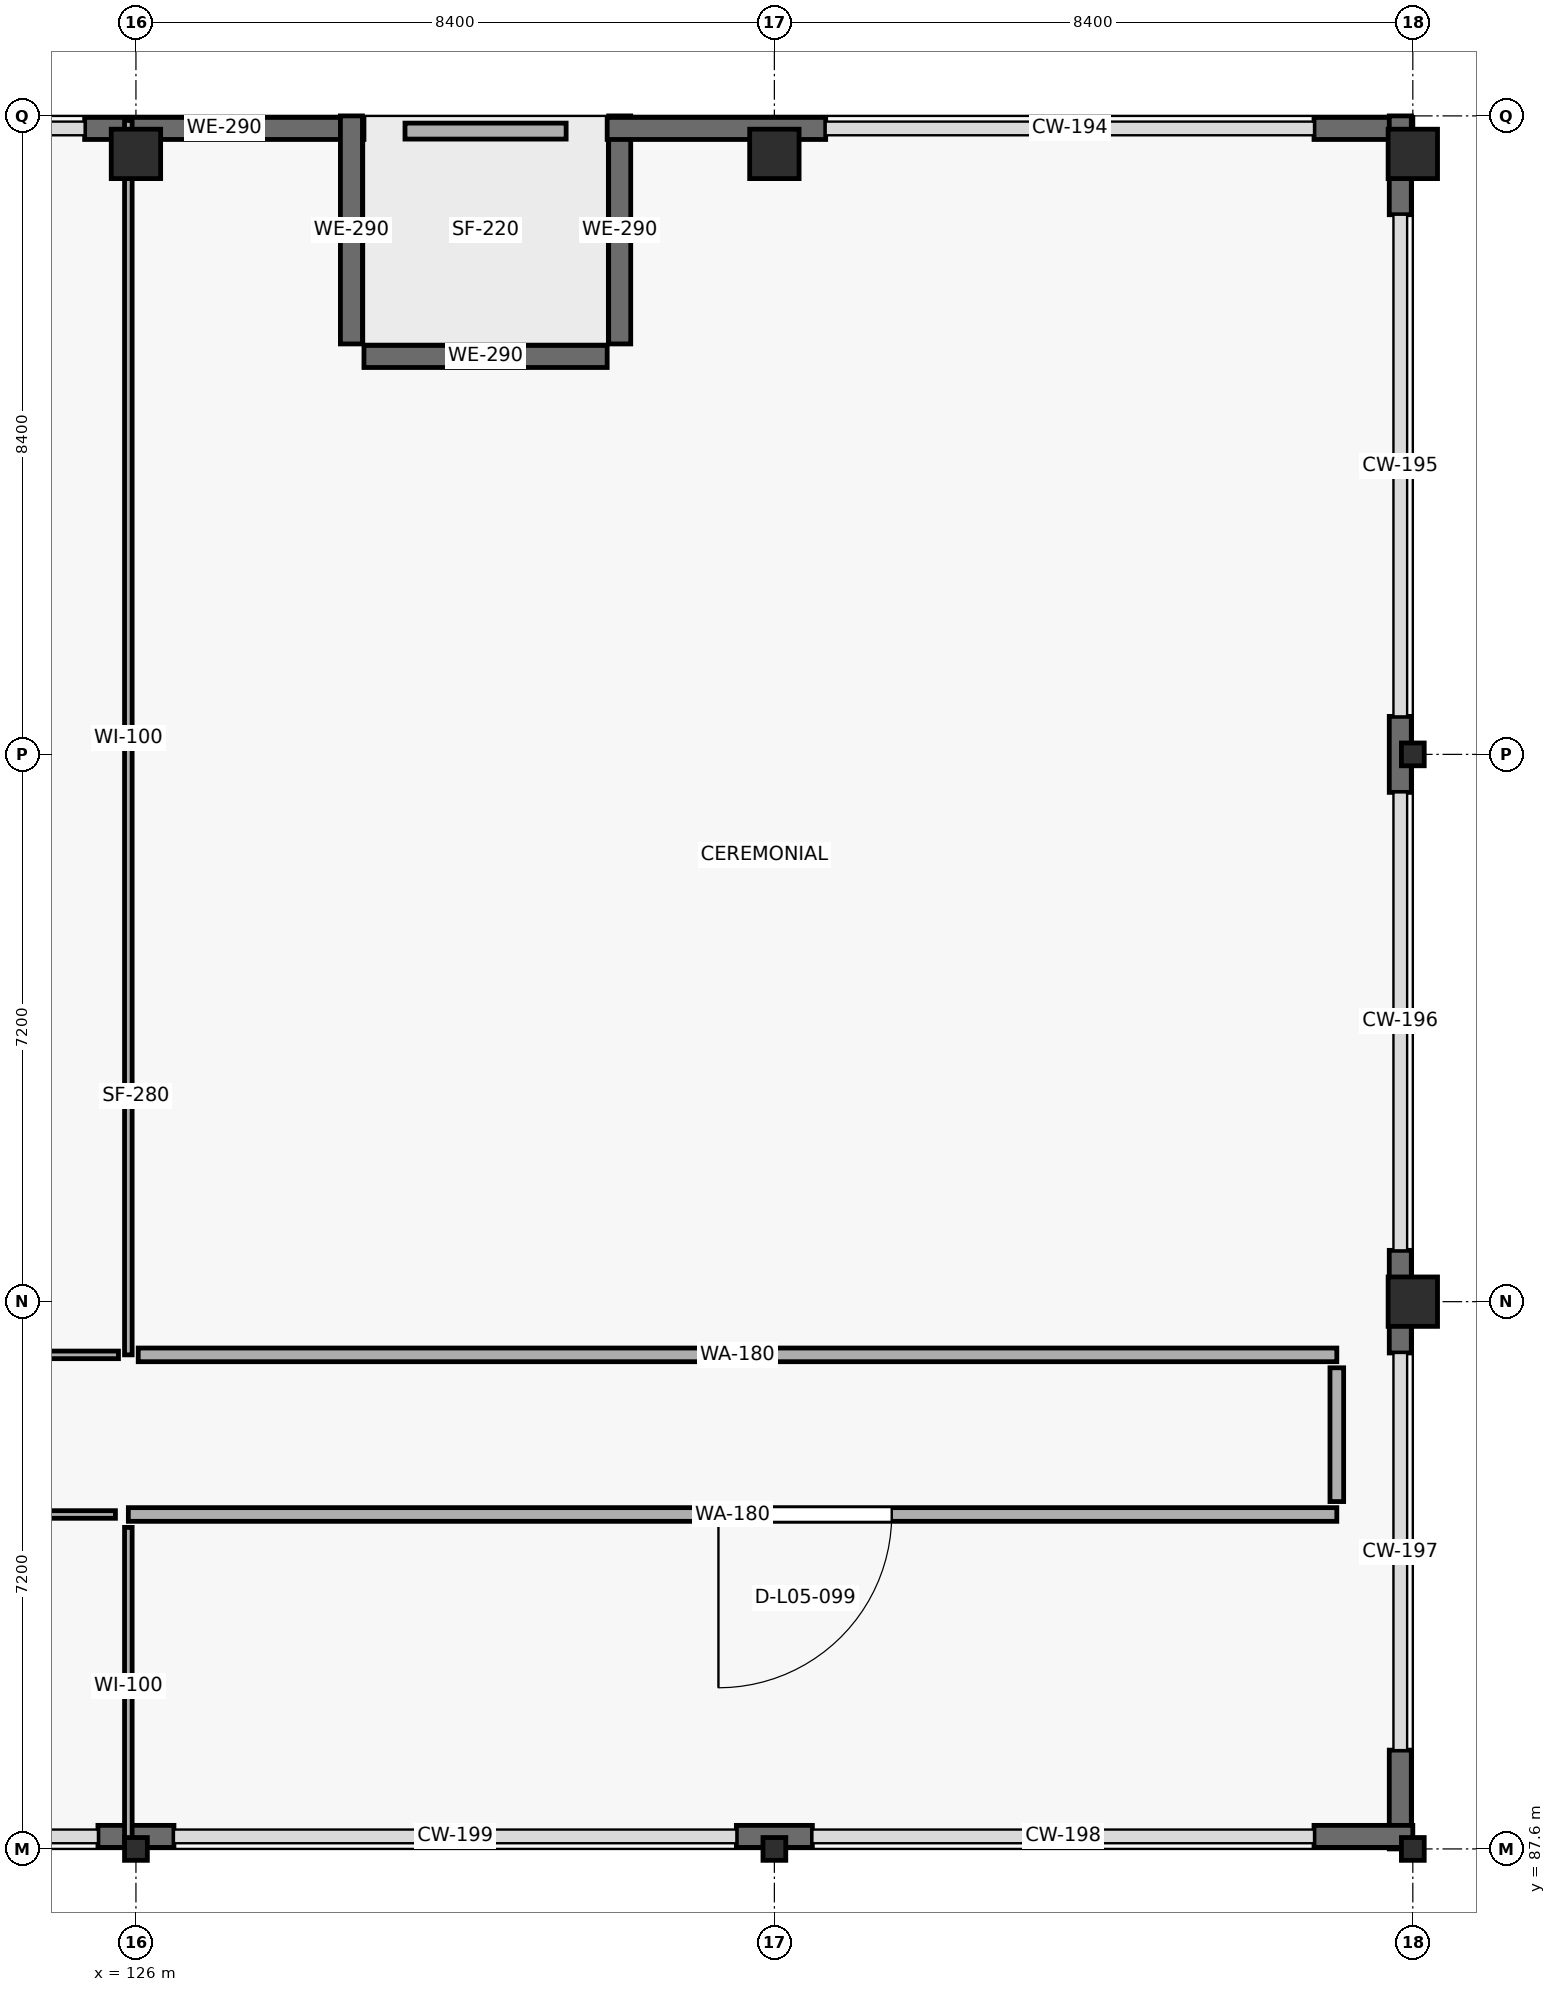
"""IFC4 building model, lengths in metres.
Left out: names, types, materials, properties, quantities, classifications, styles, units other than length and angle.
Written with IfcOpenShell. Run it as: python <this file> out.ifc"""

import sys

from ifc_helpers import new_model, si_unit, direction, frame, frame_2d, origin, origin_2d, place, context, subcontext, project, spatial, rectangle, hollow_rectangle, extrude, element, fill, save


model = new_model("IFC4")
c1 = context("Model", 3, precision=1e-05, world=origin(), true_north=direction((0.0, 1.0)))
c2 = subcontext(c1, "Body", "Model", "MODEL_VIEW")
j1 = project(units=[si_unit("LENGTHUNIT", "METRE"), si_unit("PLANEANGLEUNIT", "RADIAN")], contexts=[c1])
p1 = place(None, origin())
s1 = spatial("IfcSite", under=j1, at=p1, CompositionType="ELEMENT")
p2 = place(p1, origin())
s2 = spatial("IfcBuilding", under=s1, at=p2, CompositionType="ELEMENT")
p3 = place(p2, frame((0.0, 0.0, 20.4)))
s3 = spatial("IfcBuildingStorey", under=s2, at=p3, CompositionType="ELEMENT", Elevation=20.4)
p4 = place(p3, frame((126.0, 87.6, 0.0), z_axis=(0.0, 0.0, 1.0), x_axis=(1.0, 0.0, 0.0)))
e1 = element("IfcColumn", 1, at=p4, inside=s3, PredefinedType="COLUMN", context=c2, shape_type="SweptSolid", body=[
    extrude(hollow_rectangle(XDim=0.3, YDim=0.3, WallThickness=0.012, at=origin_2d()), origin(), (0.0, 0.0, 1.0), 5.1),
])
p5 = place(p3, frame((126.0, 109.9, 0.0), z_axis=(0.0, 0.0, 1.0), x_axis=(1.0, 0.0, 0.0)))
e2 = element("IfcColumn", 2, at=p5, inside=s3, PredefinedType="COLUMN", context=c2, shape_type="SweptSolid", body=[
    extrude(rectangle(XDim=0.65, YDim=0.65, at=origin_2d()), origin(), (0.0, 0.0, 1.0), 5.1),
])
p6 = place(p3, frame((134.4, 87.6, 0.0), z_axis=(0.0, 0.0, 1.0), x_axis=(1.0, 0.0, 0.0)))
e3 = element("IfcColumn", 3, at=p6, inside=s3, PredefinedType="COLUMN", context=c2, shape_type="SweptSolid", body=[
    extrude(hollow_rectangle(XDim=0.3, YDim=0.3, WallThickness=0.012, at=origin_2d()), origin(), (0.0, 0.0, 1.0), 5.1),
])
p7 = place(p3, frame((134.4, 109.9, 0.0), z_axis=(0.0, 0.0, 1.0), x_axis=(1.0, 0.0, 0.0)))
e4 = element("IfcColumn", 4, at=p7, inside=s3, PredefinedType="COLUMN", context=c2, shape_type="SweptSolid", body=[
    extrude(rectangle(XDim=0.65, YDim=0.65, at=origin_2d()), origin(), (0.0, 0.0, 1.0), 5.1),
])
p8 = place(p3, frame((142.8, 87.6, 0.0), z_axis=(0.0, 0.0, 1.0), x_axis=(1.0, 0.0, 0.0)))
e5 = element("IfcColumn", 5, at=p8, inside=s3, PredefinedType="COLUMN", context=c2, shape_type="SweptSolid", body=[
    extrude(hollow_rectangle(XDim=0.3, YDim=0.3, WallThickness=0.012, at=origin_2d()), origin(), (0.0, 0.0, 1.0), 5.1),
])
p9 = place(p3, frame((142.8, 94.8, 0.0), z_axis=(0.0, 0.0, 1.0), x_axis=(1.0, 0.0, 0.0)))
e6 = element("IfcColumn", 6, at=p9, inside=s3, PredefinedType="COLUMN", context=c2, shape_type="SweptSolid", body=[
    extrude(rectangle(XDim=0.65, YDim=0.65, at=origin_2d()), origin(), (0.0, 0.0, 1.0), 5.1),
])
p10 = place(p3, frame((142.8, 102.0, 0.0), z_axis=(0.0, 0.0, 1.0), x_axis=(1.0, 0.0, 0.0)))
e7 = element("IfcColumn", 7, at=p10, inside=s3, PredefinedType="COLUMN", context=c2, shape_type="SweptSolid", body=[
    extrude(hollow_rectangle(XDim=0.3, YDim=0.3, WallThickness=0.012, at=origin_2d()), origin(), (0.0, 0.0, 1.0), 5.1),
])
p11 = place(p3, frame((142.8, 109.9, 0.0), z_axis=(0.0, 0.0, 1.0), x_axis=(1.0, 0.0, 0.0)))
e8 = element("IfcColumn", 8, at=p11, inside=s3, PredefinedType="COLUMN", context=c2, shape_type="SweptSolid", body=[
    extrude(rectangle(XDim=0.65, YDim=0.65, at=origin_2d()), origin(), (0.0, 0.0, 1.0), 5.1),
])
p12 = place(p3, frame((125.325, 110.235, 0.0), z_axis=(0.0, 0.0, 1.0), x_axis=(1.0, 0.0, 0.0)))
e9 = element("IfcWall", 9, at=p12, inside=s3, PredefinedType="SOLIDWALL", context=c2, shape_type="SweptSolid", body=[
    extrude(rectangle(XDim=3.675, YDim=0.29, at=frame_2d((1.837, 0.0))), origin(), (0.0, 0.0, 1.0), 4.84),
])
p13 = place(p3, frame((128.835, 110.4, 0.0), z_axis=(0.0, 0.0, 1.0), x_axis=(0.0, -1.0, 0.0)))
e10 = element("IfcWall", 10, at=p13, inside=s3, PredefinedType="SOLIDWALL", context=c2, shape_type="SweptSolid", body=[
    extrude(rectangle(XDim=3.0, YDim=0.29, at=frame_2d((1.5, 0.0))), origin(), (0.0, 0.0, 1.0), 4.84),
])
p14 = place(p3, frame((129.0, 107.235, 0.0), z_axis=(0.0, 0.0, 1.0), x_axis=(1.0, 0.0, 0.0)))
e11 = element("IfcWall", 11, at=p14, inside=s3, PredefinedType="SOLIDWALL", context=c2, shape_type="SweptSolid", body=[
    extrude(rectangle(XDim=3.2, YDim=0.29, at=frame_2d((1.6, 0.0))), origin(), (0.0, 0.0, 1.0), 4.84),
])
p15 = place(p3, frame((132.365, 107.4, 0.0), z_axis=(0.0, 0.0, 1.0), x_axis=(0.0, 1.0, 0.0)))
e12 = element("IfcWall", 12, at=p15, inside=s3, PredefinedType="SOLIDWALL", context=c2, shape_type="SweptSolid", body=[
    extrude(rectangle(XDim=3.0, YDim=0.29, at=frame_2d((1.5, 0.0))), origin(), (0.0, 0.0, 1.0), 4.84),
])
p16 = place(p3, frame((132.2, 110.235, 0.0), z_axis=(0.0, 0.0, 1.0), x_axis=(1.0, 0.0, 0.0)))
e13 = element("IfcWall", 13, at=p16, inside=s3, PredefinedType="SOLIDWALL", context=c2, shape_type="SweptSolid", body=[
    extrude(rectangle(XDim=2.875, YDim=0.29, at=frame_2d((1.438, 0.0))), origin(), (0.0, 0.0, 1.0), 4.84),
])
p17 = place(p3, frame((141.5, 110.235, 0.0), z_axis=(0.0, 0.0, 1.0), x_axis=(1.0, 0.0, 0.0)))
e14 = element("IfcWall", 14, at=p17, inside=s3, PredefinedType="SOLIDWALL", context=c2, shape_type="SweptSolid", body=[
    extrude(rectangle(XDim=1.3, YDim=0.29, at=frame_2d((0.65, 0.0))), origin(), (0.0, 0.0, 1.0), 4.84),
])
p18 = place(p3, frame((142.635, 110.4, 0.0), z_axis=(0.0, 0.0, 1.0), x_axis=(0.0, -1.0, 0.0)))
e15 = element("IfcWall", 15, at=p18, inside=s3, PredefinedType="SOLIDWALL", context=c2, shape_type="SweptSolid", body=[
    extrude(rectangle(XDim=1.3, YDim=0.29, at=frame_2d((0.65, 0.0))), origin(), (0.0, 0.0, 1.0), 4.84),
])
p19 = place(p3, frame((142.635, 102.5, 0.0), z_axis=(0.0, 0.0, 1.0), x_axis=(0.0, -1.0, 0.0)))
e16 = element("IfcWall", 16, at=p19, inside=s3, PredefinedType="SOLIDWALL", context=c2, shape_type="SweptSolid", body=[
    extrude(rectangle(XDim=1.0, YDim=0.29, at=frame_2d((0.5, 0.0))), origin(), (0.0, 0.0, 1.0), 4.84),
])
p20 = place(p3, frame((142.635, 95.475, 0.0), z_axis=(0.0, 0.0, 1.0), x_axis=(0.0, -1.0, 0.0)))
e17 = element("IfcWall", 17, at=p20, inside=s3, PredefinedType="SOLIDWALL", context=c2, shape_type="SweptSolid", body=[
    extrude(rectangle(XDim=1.35, YDim=0.29, at=frame_2d((0.675, 0.0))), origin(), (0.0, 0.0, 1.0), 4.84),
])
p21 = place(p3, frame((142.635, 88.9, 0.0), z_axis=(0.0, 0.0, 1.0), x_axis=(0.0, -1.0, 0.0)))
e18 = element("IfcWall", 18, at=p21, inside=s3, PredefinedType="SOLIDWALL", context=c2, shape_type="SweptSolid", body=[
    extrude(rectangle(XDim=1.3, YDim=0.29, at=frame_2d((0.65, 0.0))), origin(), (0.0, 0.0, 1.0), 4.84),
])
p22 = place(p3, frame((142.8, 87.765, 0.0), z_axis=(0.0, 0.0, 1.0), x_axis=(-1.0, 0.0, 0.0)))
e19 = element("IfcWall", 19, at=p22, inside=s3, PredefinedType="SOLIDWALL", context=c2, shape_type="SweptSolid", body=[
    extrude(rectangle(XDim=1.3, YDim=0.29, at=frame_2d((0.65, 0.0))), origin(), (0.0, 0.0, 1.0), 4.84),
])
for number, where, z_axis, x_axis in (
    (20, (134.9, 87.765, 0.0), (0.0, 0.0, 1.0), (-1.0, 0.0, 0.0)),
    (21, (126.5, 87.765, 0.0), (0.0, 0.0, 1.0), (-1.0, 0.0, 0.0)),
):
    element("IfcWall", number, at=place(p3, frame(where, z_axis=z_axis, x_axis=x_axis)), inside=s3, PredefinedType="SOLIDWALL", context=c2, shape_type="SweptSolid", body=[
        extrude(rectangle(XDim=1.0, YDim=0.29, at=frame_2d((0.5, 0.0))), origin(), (0.0, 0.0, 1.0), 4.84),
    ])
p23 = place(p3, frame((129.54, 110.2, 0.0), z_axis=(0.0, 0.0, 1.0), x_axis=(1.0, 0.0, 0.0)))
e22 = element("IfcWall", 22, at=p23, inside=s3, PredefinedType="PARAPET", context=c2, shape_type="SweptSolid", body=[
    extrude(rectangle(XDim=2.12, YDim=0.21, at=frame_2d((1.06, 0.0))), origin(), (0.0, 0.0, 1.0), 1.12),
])
p24 = place(p3, frame((125.9, 110.34, 0.0), z_axis=(0.0, 0.0, 1.0), x_axis=(0.0, -1.0, 0.0)))
e23 = element("IfcWall", 23, at=p24, inside=s3, PredefinedType="PARTITIONING", context=c2, shape_type="SweptSolid", body=[
    extrude(rectangle(XDim=16.24, YDim=0.1, at=frame_2d((8.12, 0.0))), origin(), (0.0, 0.0, 1.0), 4.84),
])
p25 = place(p3, frame((125.9, 92.0, 0.0), z_axis=(0.0, 0.0, 1.0), x_axis=(1.0, 0.0, 0.0)))
e24 = element("IfcWall", 24, at=p25, inside=s3, PredefinedType="PARTITIONING", context=c2, shape_type="SweptSolid", body=[
    extrude(rectangle(XDim=15.9, YDim=0.18, at=frame_2d((7.95, 0.0))), origin(), (0.0, 0.0, 1.0), 4.84),
])
p26 = place(p25, frame((7.764, 0.0, 0.0)))
e25 = element("IfcOpeningElement", 25, at=p26, cuts=e24, PredefinedType="OPENING", context=c2, shape_type="SweptSolid", body=[
    extrude(rectangle(XDim=2.28, YDim=2.75, at=frame_2d((1.14, 1.375))), frame((0.0, 0.1, 0.0), z_axis=(0.0, -1.0, 0.0), x_axis=(1.0, 0.0, 0.0)), (0.0, 0.0, 1.0), 0.2),
])
p27 = place(p3, frame((141.8, 94.1, 0.0), z_axis=(0.0, 0.0, 1.0), x_axis=(-1.0, 0.0, 0.0)))
e26 = element("IfcWall", 26, at=p27, inside=s3, PredefinedType="PARTITIONING", context=c2, shape_type="SweptSolid", body=[
    extrude(rectangle(XDim=15.77, YDim=0.18, at=frame_2d((7.885, 0.0))), origin(), (0.0, 0.0, 1.0), 4.84),
])
p28 = place(p3, frame((125.9, 91.83, 0.0), z_axis=(0.0, 0.0, 1.0), x_axis=(0.0, -1.0, 0.0)))
e27 = element("IfcWall", 27, at=p28, inside=s3, PredefinedType="PARTITIONING", context=c2, shape_type="SweptSolid", body=[
    extrude(rectangle(XDim=4.17, YDim=0.1, at=frame_2d((2.085, 0.0))), origin(), (0.0, 0.0, 1.0), 4.84),
])
p29 = place(p3, frame((125.77, 94.1, 0.0), z_axis=(0.0, 0.0, 1.0), x_axis=(-1.0, 0.0, 0.0)))
e28 = element("IfcWall", 28, at=p29, inside=s3, PredefinedType="PARTITIONING", context=c2, shape_type="SweptSolid", body=[
    extrude(rectangle(XDim=3.14, YDim=0.1, at=frame_2d((1.57, 0.0))), origin(), (0.0, 0.0, 1.0), 4.84),
])
p30 = place(p3, frame((122.63, 92.0, 0.0), z_axis=(0.0, 0.0, 1.0), x_axis=(1.0, 0.0, 0.0)))
e29 = element("IfcWall", 29, at=p30, inside=s3, PredefinedType="PARTITIONING", context=c2, shape_type="SweptSolid", body=[
    extrude(rectangle(XDim=3.1, YDim=0.1, at=frame_2d((1.55, 0.0))), origin(), (0.0, 0.0, 1.0), 4.84),
])
p31 = place(p3, frame((141.8, 92.17, 0.0), z_axis=(0.0, 0.0, 1.0), x_axis=(0.0, 1.0, 0.0)))
e30 = element("IfcWall", 30, at=p31, inside=s3, PredefinedType="PARTITIONING", context=c2, shape_type="SweptSolid", body=[
    extrude(rectangle(XDim=1.76, YDim=0.18, at=frame_2d((0.88, 0.0))), origin(), (0.0, 0.0, 1.0), 4.84),
])
p32 = place(p26, origin())
e31 = element("IfcDoor", 31, at=p32, inside=s3, OperationType="SINGLE_SWING_RIGHT", PredefinedType="DOOR", context=c2, shape_type="SweptSolid", body=[
    extrude(rectangle(XDim=2.28, YDim=2.75, at=frame_2d((1.14, 1.375))), frame((0.0, 0.025, 0.0), z_axis=(0.0, -1.0, 0.0), x_axis=(1.0, 0.0, 0.0)), (0.0, 0.0, 1.0), 0.05),
])
fill(e25, e31)
save(model, sys.argv[1])
